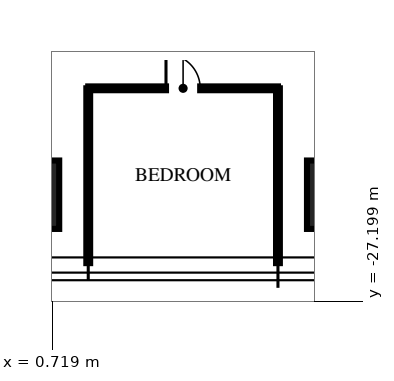
"""IFC4 building model, lengths in metres.
Left out: names, types, materials, properties, quantities, classifications, styles, units other than length and angle.
Written with IfcOpenShell. Run it as: python <this file> out.ifc"""

import sys

from ifc_helpers import new_model, si_unit, direction, frame, frame_2d, origin, origin_2d, place, context, subcontext, project, spatial, rectangle, extrude, element, fill, save


model = new_model("IFC4")
c1 = context("Model", 3, precision=1e-05, world=origin(), true_north=direction((0.0, 1.0)))
c2 = subcontext(c1, "Body", "Model", "MODEL_VIEW")
j1 = project(units=[si_unit("LENGTHUNIT", "METRE"), si_unit("PLANEANGLEUNIT", "RADIAN")], contexts=[c1])
p1 = place(None, origin())
s1 = spatial("IfcSite", under=j1, at=p1, CompositionType="ELEMENT")
p2 = place(p1, origin())
s2 = spatial("IfcBuilding", under=s1, at=p2, CompositionType="ELEMENT")
p3 = place(p2, frame((0.0, 0.0, 214.5)))
s3 = spatial("IfcBuildingStorey", under=s2, at=p3, CompositionType="ELEMENT", Elevation=214.5)
for number, where, z_axis, x_axis in (
    (1, (8.32, -24.4, 0.0), (0.0, 0.0, 1.0), (1.0, 0.0, 0.0)),
    (2, (0.0, -24.4, 0.0), (0.0, 0.0, 1.0), (1.0, 0.0, 0.0)),
):
    element("IfcColumn", number, at=place(p3, frame(where, z_axis=z_axis, x_axis=x_axis)), inside=s3, PredefinedType="COLUMN", context=c2, shape_type="SweptSolid", body=[
        extrude(rectangle(XDim=1.8, YDim=1.8, at=origin_2d()), origin(), (0.0, 0.0, 1.0), 3.75),
    ])
for number, where, z_axis, x_axis in (
    (3, (1.664, -21.6, 0.0), (0.0, 0.0, 1.0), (0.0, -1.0, 0.0)),
    (4, (6.656, -21.6, 0.0), (0.0, 0.0, 1.0), (0.0, -1.0, 0.0)),
):
    element("IfcWall", number, at=place(p3, frame(where, z_axis=z_axis, x_axis=x_axis)), inside=s3, PredefinedType="PARTITIONING", context=c2, shape_type="SweptSolid", body=[
        extrude(rectangle(XDim=4.6, YDim=0.1, at=frame_2d((2.3, 0.0))), origin(), (0.0, 0.0, 1.0), 2.91),
    ])
p4 = place(p3, frame((1.664, -21.6, 0.0), z_axis=(0.0, 0.0, 1.0), x_axis=(1.0, 0.0, 0.0)))
e5 = element("IfcWall", 5, at=p4, inside=s3, PredefinedType="PARTITIONING", context=c2, shape_type="SweptSolid", body=[
    extrude(rectangle(XDim=4.992, YDim=0.1, at=frame_2d((2.496, 0.0))), origin(), (0.0, 0.0, 1.0), 2.81),
])
p5 = place(p4, frame((2.046, 0.0, 0.0)))
e6 = element("IfcOpeningElement", 6, at=p5, cuts=e5, PredefinedType="OPENING", context=c2, shape_type="SweptSolid", body=[
    extrude(rectangle(XDim=0.9, YDim=2.1, at=frame_2d((0.45, 1.05))), frame((0.0, 0.06, 0.0), z_axis=(0.0, -1.0, 0.0), x_axis=(1.0, 0.0, 0.0)), (0.0, 0.0, 1.0), 0.12),
])
p6 = place(p5, origin())
e7 = element("IfcDoor", 7, at=p6, inside=s3, OperationType="SINGLE_SWING_LEFT", PredefinedType="DOOR", context=c2, shape_type="SweptSolid", body=[
    extrude(rectangle(XDim=0.9, YDim=2.1, at=frame_2d((0.45, 1.05))), frame((0.0, 0.025, 0.0), z_axis=(0.0, -1.0, 0.0), x_axis=(1.0, 0.0, 0.0)), (0.0, 0.0, 1.0), 0.05),
])
fill(e6, e7)
save(model, sys.argv[1])
